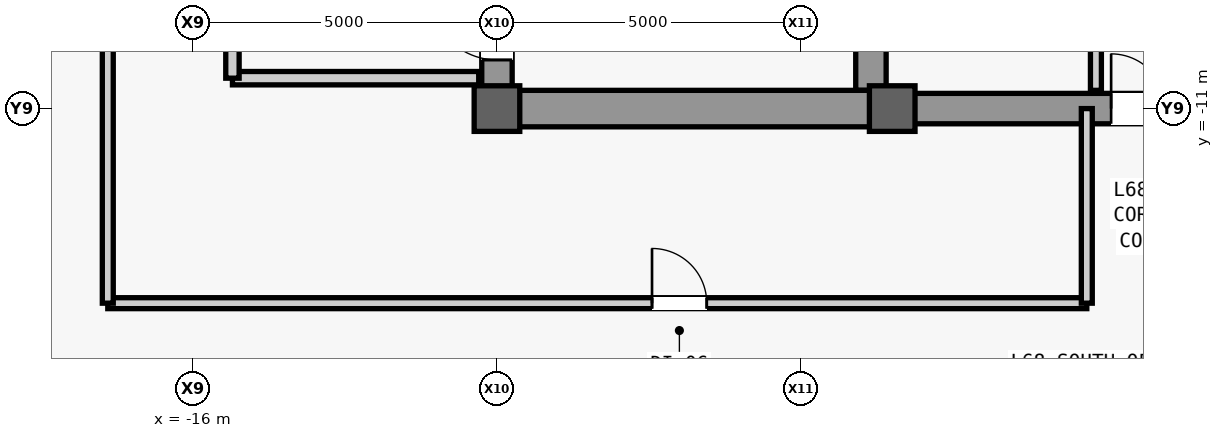
"""IFC4 building model, lengths in metres.
Left out: names, types, materials, properties, quantities, classifications, styles, units other than length and angle.
Written with IfcOpenShell. Run it as: python <this file> out.ifc"""

import sys

from ifc_helpers import new_model, si_unit, direction, frame, frame_2d, origin, origin_2d, place, context, subcontext, project, spatial, rectangle, extrude, source, transform, mapped, element, fill, save


model = new_model("IFC4")
c1 = context("Model", 3, precision=1e-05, world=origin(), true_north=direction((0.0, 1.0)))
c2 = subcontext(c1, "Body", "Model", "MODEL_VIEW")
j1 = project(units=[si_unit("LENGTHUNIT", "METRE"), si_unit("PLANEANGLEUNIT", "RADIAN")], contexts=[c1])
p1 = place(None, origin())
s1 = spatial("IfcSite", under=j1, at=p1, CompositionType="ELEMENT")
p2 = place(p1, origin())
s2 = spatial("IfcBuilding", under=s1, at=p2, CompositionType="ELEMENT")
p3 = place(p2, frame((0.0, 0.0, 289.5)))
s3 = spatial("IfcBuildingStorey", under=s2, at=p3, CompositionType="ELEMENT", Elevation=289.5)
m1 = source(origin(), c2, "Body", "SweptSolid", [
    extrude(rectangle(XDim=22.0, YDim=0.5, at=frame_2d((11.0, 0.0))), origin(), (0.0, 0.0, 1.0), 3.78),
])
p4 = place(p3, frame((-11.0, -11.0, 0.0), z_axis=(0.0, 0.0, 1.0), x_axis=(0.0, 1.0, 0.0)))
e1 = element("IfcWall", 1, at=p4, inside=s3, PredefinedType="SHEAR", context=c2, shape_type="MappedRepresentation", body=[
    mapped(m1, transform((0.0, 0.0, 0.0), scale=1.0)),
])
m2 = source(origin(), c2, "Body", "SweptSolid", [
    extrude(rectangle(XDim=1.1, YDim=2.2, at=frame_2d((0.55, 1.1))), frame((0.0, 0.26, 0.0), z_axis=(0.0, -1.0, 0.0), x_axis=(1.0, 0.0, 0.0)), (0.0, 0.0, 1.0), 0.52),
])
p5 = place(p4, frame((0.8, 0.0, 0.0)))
e2 = element("IfcOpeningElement", 2, at=p5, cuts=e1, PredefinedType="OPENING", context=c2, shape_type="MappedRepresentation", body=[
    mapped(m2, transform((0.0, 0.0, 0.0), scale=1.0)),
])
p6 = place(p4, frame((12.5, 0.0, 0.0)))
e3 = element("IfcOpeningElement", 3, at=p6, cuts=e1, PredefinedType="OPENING", context=c2, shape_type="MappedRepresentation", body=[
    mapped(m2, transform((0.0, 0.0, 0.0), scale=1.0)),
])
m3 = source(origin(), c2, "Body", "SweptSolid", [
    extrude(rectangle(XDim=0.9, YDim=2.15, at=frame_2d((0.45, 1.075))), frame((0.0, 0.26, 0.0), z_axis=(0.0, -1.0, 0.0), x_axis=(1.0, 0.0, 0.0)), (0.0, 0.0, 1.0), 0.52),
])
p7 = place(p4, frame((7.575, 0.0, 0.0)))
e4 = element("IfcOpeningElement", 4, at=p7, cuts=e1, PredefinedType="OPENING", context=c2, shape_type="MappedRepresentation", body=[
    mapped(m3, transform((0.0, 0.0, 0.0), scale=1.0)),
])
m4 = source(origin(), c2, "Body", "SweptSolid", [
    extrude(rectangle(XDim=1.2, YDim=2.3, at=frame_2d((0.6, 1.15))), frame((0.0, 0.26, 0.0), z_axis=(0.0, -1.0, 0.0), x_axis=(1.0, 0.0, 0.0)), (0.0, 0.0, 1.0), 0.52),
])
p8 = place(p4, frame((14.6, 0.0, 0.0)))
e5 = element("IfcOpeningElement", 5, at=p8, cuts=e1, PredefinedType="OPENING", context=c2, shape_type="MappedRepresentation", body=[
    mapped(m4, transform((0.0, 0.0, 0.0), scale=1.0)),
])
p9 = place(p4, frame((18.2, 0.0, 0.0)))
e6 = element("IfcOpeningElement", 6, at=p9, cuts=e1, PredefinedType="OPENING", context=c2, shape_type="MappedRepresentation", body=[
    mapped(m4, transform((0.0, 0.0, 0.0), scale=1.0)),
])
m5 = source(origin(), c2, "Body", "SweptSolid", [
    extrude(rectangle(XDim=1.3, YDim=2.3, at=frame_2d((0.65, 1.15))), frame((0.0, 0.26, 0.0), z_axis=(0.0, -1.0, 0.0), x_axis=(1.0, 0.0, 0.0)), (0.0, 0.0, 1.0), 0.52),
])
p10 = place(p4, frame((2.7, 0.0, 0.0)))
e7 = element("IfcOpeningElement", 7, at=p10, cuts=e1, PredefinedType="OPENING", context=c2, shape_type="MappedRepresentation", body=[
    mapped(m5, transform((0.0, 0.0, 0.0), scale=1.0)),
])
m6 = source(origin(), c2, "Body", "SweptSolid", [
    extrude(rectangle(XDim=21.4, YDim=0.5, at=frame_2d((10.7, 0.0))), origin(), (0.0, 0.0, 1.0), 3.78),
])
p11 = place(p3, frame((-4.85, -10.7, 0.0), z_axis=(0.0, 0.0, 1.0), x_axis=(0.0, 1.0, 0.0)))
e8 = element("IfcWall", 8, at=p11, inside=s3, PredefinedType="SHEAR", context=c2, shape_type="MappedRepresentation", body=[
    mapped(m6, transform((0.0, 0.0, 0.0), scale=1.0)),
])
m7 = source(origin(), c2, "Body", "SweptSolid", [
    extrude(rectangle(XDim=5.9, YDim=0.6, at=frame_2d((2.95, 0.0))), origin(), (0.0, 0.0, 1.0), 3.78),
])
p12 = place(p3, frame((-10.75, -11.0, 0.0), z_axis=(0.0, 0.0, 1.0), x_axis=(1.0, 0.0, 0.0)))
e9 = element("IfcWall", 9, at=p12, inside=s3, PredefinedType="SHEAR", context=c2, shape_type="MappedRepresentation", body=[
    mapped(m7, transform((0.0, 0.0, 0.0), scale=1.0)),
])
m8 = source(origin(), c2, "Body", "SweptSolid", [
    extrude(rectangle(XDim=9.2, YDim=0.5, at=frame_2d((4.6, 0.0))), origin(), (0.0, 0.0, 1.0), 3.78),
])
p13 = place(p3, frame((-4.6, -11.0, 0.0), z_axis=(0.0, 0.0, 1.0), x_axis=(1.0, 0.0, 0.0)))
e10 = element("IfcWall", 10, at=p13, inside=s3, PredefinedType="SHEAR", context=c2, shape_type="MappedRepresentation", body=[
    mapped(m8, transform((0.0, 0.0, 0.0), scale=1.0)),
])
m9 = source(origin(), c2, "Body", "SweptSolid", [
    extrude(rectangle(XDim=1.8, YDim=2.25, at=frame_2d((0.9, 1.125))), frame((0.0, 0.26, 0.0), z_axis=(0.0, -1.0, 0.0), x_axis=(1.0, 0.0, 0.0)), (0.0, 0.0, 1.0), 0.52),
])
p14 = place(p13, frame((3.7, 0.0, 0.0)))
e11 = element("IfcOpeningElement", 11, at=p14, cuts=e10, PredefinedType="OPENING", context=c2, shape_type="MappedRepresentation", body=[
    mapped(m9, transform((0.0, 0.0, 0.0), scale=1.0)),
])
m10 = source(origin(), c2, "Body", "SweptSolid", [
    extrude(rectangle(XDim=0.75, YDim=0.75, at=origin_2d()), origin(), (0.0, 0.0, 1.0), 4.0),
])
for number, where, z_axis, x_axis in (
    (12, (-11.0, -11.0, 0.0), (0.0, 0.0, 1.0), (1.0, 0.0, 0.0)),
    (13, (-4.5, -11.0, 0.0), (0.0, 0.0, 1.0), (1.0, 0.0, 0.0)),
):
    element("IfcColumn", number, at=place(p3, frame(where, z_axis=z_axis, x_axis=x_axis)), inside=s3, PredefinedType="COLUMN", context=c2, shape_type="MappedRepresentation", body=[
        mapped(m10, transform((0.0, 0.0, 0.0), scale=1.0)),
    ])
m11 = source(origin(), c2, "Body", "SweptSolid", [
    extrude(rectangle(XDim=4.05, YDim=0.22, at=frame_2d((2.025, 0.0))), origin(), (0.0, 0.0, 1.0), 3.78),
])
p15 = place(p3, frame((-15.35, -10.5, 0.0), z_axis=(0.0, 0.0, 1.0), x_axis=(1.0, 0.0, 0.0)))
e14 = element("IfcWall", 14, at=p15, inside=s3, PredefinedType="PARTITIONING", context=c2, shape_type="MappedRepresentation", body=[
    mapped(m11, transform((0.0, 0.0, 0.0), scale=1.0)),
])
m12 = source(origin(), c2, "Body", "SweptSolid", [
    extrude(rectangle(XDim=4.4, YDim=0.22, at=frame_2d((2.2, 0.0))), origin(), (0.0, 0.0, 1.0), 3.78),
])
p16 = place(p3, frame((-15.35, -10.5, 0.0), z_axis=(0.0, 0.0, 1.0), x_axis=(0.0, 1.0, 0.0)))
e15 = element("IfcWall", 15, at=p16, inside=s3, PredefinedType="PARTITIONING", context=c2, shape_type="MappedRepresentation", body=[
    mapped(m12, transform((0.0, 0.0, 0.0), scale=1.0)),
])
m13 = source(origin(), c2, "Body", "SweptSolid", [
    extrude(rectangle(XDim=1.2, YDim=2.2, at=frame_2d((0.6, 1.1))), frame((0.0, 0.12, 0.0), z_axis=(0.0, -1.0, 0.0), x_axis=(1.0, 0.0, 0.0)), (0.0, 0.0, 1.0), 0.24),
])
p17 = place(p16, frame((1.6, 0.0, 0.0)))
e16 = element("IfcOpeningElement", 16, at=p17, cuts=e15, PredefinedType="OPENING", context=c2, shape_type="MappedRepresentation", body=[
    mapped(m13, transform((0.0, 0.0, 0.0), scale=1.0)),
])
m14 = source(origin(), c2, "Body", "SweptSolid", [
    extrude(rectangle(XDim=5.4, YDim=0.18, at=frame_2d((2.7, 0.0))), origin(), (0.0, 0.0, 1.0), 3.78),
])
p18 = place(p3, frame((-1.15, -10.7, 0.0), z_axis=(0.0, 0.0, 1.0), x_axis=(0.0, 1.0, 0.0)))
e17 = element("IfcWall", 17, at=p18, inside=s3, PredefinedType="PARTITIONING", context=c2, shape_type="MappedRepresentation", body=[
    mapped(m14, transform((0.0, 0.0, 0.0), scale=1.0)),
])
m15 = source(origin(), c2, "Body", "SweptSolid", [
    extrude(rectangle(XDim=0.9, YDim=2.15, at=frame_2d((0.45, 1.075))), frame((0.0, 0.1, 0.0), z_axis=(0.0, -1.0, 0.0), x_axis=(1.0, 0.0, 0.0)), (0.0, 0.0, 1.0), 0.2),
])
p19 = place(p18, frame((1.15, 0.0, 0.0)))
e18 = element("IfcOpeningElement", 18, at=p19, cuts=e17, PredefinedType="OPENING", context=c2, shape_type="MappedRepresentation", body=[
    mapped(m15, transform((0.0, 0.0, 0.0), scale=1.0)),
])
p20 = place(p18, frame((3.85, 0.0, 0.0)))
e19 = element("IfcOpeningElement", 19, at=p20, cuts=e17, PredefinedType="OPENING", context=c2, shape_type="MappedRepresentation", body=[
    mapped(m15, transform((0.0, 0.0, 0.0), scale=1.0)),
])
m16 = source(origin(), c2, "Body", "SweptSolid", [
    extrude(rectangle(XDim=16.1, YDim=0.18, at=frame_2d((8.05, 0.0))), origin(), (0.0, 0.0, 1.0), 3.78),
])
p21 = place(p3, frame((-17.4, -14.2, 0.0), z_axis=(0.0, 0.0, 1.0), x_axis=(1.0, 0.0, 0.0)))
e20 = element("IfcWall", 20, at=p21, inside=s3, PredefinedType="PARTITIONING", context=c2, shape_type="MappedRepresentation", body=[
    mapped(m16, transform((0.0, 0.0, 0.0), scale=1.0)),
])
p22 = place(p21, frame((8.95, 0.0, 0.0)))
e21 = element("IfcOpeningElement", 21, at=p22, cuts=e20, PredefinedType="OPENING", context=c2, shape_type="MappedRepresentation", body=[
    mapped(m15, transform((0.0, 0.0, 0.0), scale=1.0)),
])
m17 = source(origin(), c2, "Body", "SweptSolid", [
    extrude(rectangle(XDim=4.4, YDim=0.18, at=frame_2d((2.2, 0.0))), origin(), (0.0, 0.0, 1.0), 3.78),
])
p23 = place(p3, frame((-17.4, -14.2, 0.0), z_axis=(0.0, 0.0, 1.0), x_axis=(0.0, 1.0, 0.0)))
e22 = element("IfcWall", 22, at=p23, inside=s3, PredefinedType="PARTITIONING", context=c2, shape_type="MappedRepresentation", body=[
    mapped(m17, transform((0.0, 0.0, 0.0), scale=1.0)),
])
m18 = source(origin(), c2, "Body", "SweptSolid", [
    extrude(rectangle(XDim=3.2, YDim=0.18, at=frame_2d((1.6, 0.0))), origin(), (0.0, 0.0, 1.0), 3.78),
])
p24 = place(p3, frame((-1.3, -14.2, 0.0), z_axis=(0.0, 0.0, 1.0), x_axis=(0.0, 1.0, 0.0)))
e23 = element("IfcWall", 23, at=p24, inside=s3, PredefinedType="PARTITIONING", context=c2, shape_type="MappedRepresentation", body=[
    mapped(m18, transform((0.0, 0.0, 0.0), scale=1.0)),
])
m19 = source(origin(), c2, "Body", "SweptSolid", [
    extrude(rectangle(XDim=1.1, YDim=2.2, at=frame_2d((0.55, 1.1))), frame((0.0, 0.025, 0.0), z_axis=(0.0, -1.0, 0.0), x_axis=(1.0, 0.0, 0.0)), (0.0, 0.0, 1.0), 0.05),
])
p25 = place(p5, origin())
e24 = element("IfcDoor", 24, at=p25, inside=s3, OperationType="SINGLE_SWING_RIGHT", PredefinedType="DOOR", context=c2, shape_type="MappedRepresentation", body=[
    mapped(m19, transform((0.0, 0.0, 0.0), scale=1.0)),
])
fill(e2, e24)
m20 = source(origin(), c2, "Body", "SweptSolid", [
    extrude(rectangle(XDim=1.8, YDim=2.25, at=frame_2d((0.9, 1.125))), frame((0.0, 0.025, 0.0), z_axis=(0.0, -1.0, 0.0), x_axis=(1.0, 0.0, 0.0)), (0.0, 0.0, 1.0), 0.05),
])
p26 = place(p14, origin())
e25 = element("IfcDoor", 25, at=p26, inside=s3, OperationType="SINGLE_SWING_LEFT", PredefinedType="DOOR", context=c2, shape_type="MappedRepresentation", body=[
    mapped(m20, transform((0.0, 0.0, 0.0), scale=1.0)),
])
fill(e11, e25)
m21 = source(origin(), c2, "Body", "SweptSolid", [
    extrude(rectangle(XDim=0.9, YDim=2.15, at=frame_2d((0.45, 1.075))), frame((0.0, 0.025, 0.0), z_axis=(0.0, -1.0, 0.0), x_axis=(1.0, 0.0, 0.0)), (0.0, 0.0, 1.0), 0.05),
])
p27 = place(p22, origin())
e26 = element("IfcDoor", 26, at=p27, inside=s3, OperationType="SINGLE_SWING_LEFT", PredefinedType="DOOR", context=c2, shape_type="MappedRepresentation", body=[
    mapped(m21, transform((0.0, 0.0, 0.0), scale=1.0)),
])
fill(e21, e26)
save(model, sys.argv[1])
